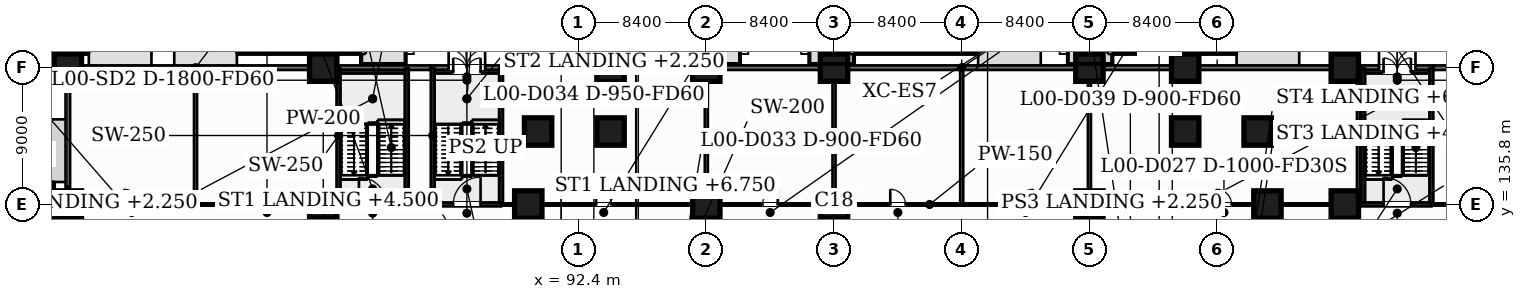
"""IFC4 building model, lengths in metres.
Left out: names, types, materials, properties, quantities, classifications, styles, units other than length and angle.
Written with IfcOpenShell. Run it as: python <this file> out.ifc"""

import sys

from ifc_helpers import new_model, si_unit, direction, frame, frame_2d, origin, origin_2d, place, context, subcontext, project, spatial, rectangle, extrude, element, fill, save


model = new_model("IFC4")
c1 = context("Model", 3, precision=1e-05, world=origin(), true_north=direction((0.0, 1.0)))
c2 = subcontext(c1, "Body", "Model", "MODEL_VIEW")
j1 = project(units=[si_unit("LENGTHUNIT", "METRE"), si_unit("PLANEANGLEUNIT", "RADIAN")], contexts=[c1])
p1 = place(None, origin())
s1 = spatial("IfcSite", under=j1, at=p1, CompositionType="ELEMENT")
p2 = place(p1, origin())
s2 = spatial("IfcBuilding", under=s1, at=p2, CompositionType="ELEMENT")
p3 = place(p2, origin())
s3 = spatial("IfcBuildingStorey", under=s2, at=p3, CompositionType="ELEMENT", Elevation=0.0)
for number, where, z_axis, x_axis in (
    (1, (58.8, 135.8, -0.35), (0.0, 0.0, 1.0), (1.0, 0.0, 0.0)),
    (2, (75.6, 135.8, -0.35), (0.0, 0.0, 1.0), (1.0, 0.0, 0.0)),
    (3, (89.088, 135.8, -0.35), (0.0, 0.0, 1.0), (1.0, 0.0, 0.0)),
    (4, (100.8, 135.8, -0.35), (0.0, 0.0, 1.0), (1.0, 0.0, 0.0)),
    (5, (109.2, 135.8, -0.35), (0.0, 0.0, 1.0), (1.0, 0.0, 0.0)),
    (6, (126.0, 135.8, -0.35), (0.0, 0.0, 1.0), (1.0, 0.0, 0.0)),
    (7, (137.711, 135.8, -0.35), (0.0, 0.0, 1.0), (1.0, 0.0, 0.0)),
    (8, (142.8, 135.8, -0.35), (0.0, 0.0, 1.0), (1.0, 0.0, 0.0)),
    (9, (89.735, 140.6, -0.35), (0.0, 0.0, 1.0), (1.0, 0.0, 0.0)),
    (10, (94.5, 140.6, -0.35), (0.0, 0.0, 1.0), (1.0, 0.0, 0.0)),
    (11, (132.3, 140.6, -0.35), (0.0, 0.0, 1.0), (1.0, 0.0, 0.0)),
    (12, (137.065, 140.6, -0.35), (0.0, 0.0, 1.0), (1.0, 0.0, 0.0)),
    (13, (58.8, 144.8, -0.35), (0.0, 0.0, 1.0), (1.0, 0.0, 0.0)),
    (14, (75.6, 144.8, -0.35), (0.0, 0.0, 1.0), (1.0, 0.0, 0.0)),
    (15, (94.5, 144.8, -0.35), (0.0, 0.0, 1.0), (1.0, 0.0, 0.0)),
    (16, (100.8, 144.8, -0.35), (0.0, 0.0, 1.0), (1.0, 0.0, 0.0)),
    (17, (109.2, 144.8, -0.35), (0.0, 0.0, 1.0), (1.0, 0.0, 0.0)),
    (18, (126.0, 144.8, -0.35), (0.0, 0.0, 1.0), (1.0, 0.0, 0.0)),
    (19, (132.3, 144.8, -0.35), (0.0, 0.0, 1.0), (1.0, 0.0, 0.0)),
    (20, (142.8, 144.8, -0.35), (0.0, 0.0, 1.0), (1.0, 0.0, 0.0)),
):
    element("IfcColumn", number, at=place(p3, frame(where, z_axis=z_axis, x_axis=x_axis)), inside=s3, PredefinedType="COLUMN", context=c2, shape_type="SweptSolid", body=[
        extrude(rectangle(XDim=1.8, YDim=1.8, at=origin_2d()), origin(), (0.0, 0.0, 1.0), 9.35),
    ])
p4 = place(p3, frame((59.7, 144.8, 0.0), z_axis=(0.0, 0.0, 1.0), x_axis=(1.0, 0.0, 0.0)))
e21 = element("IfcWall", 21, at=p4, inside=s3, PredefinedType="SOLIDWALL", context=c2, shape_type="SweptSolid", body=[
    extrude(rectangle(XDim=15.0, YDim=0.3, at=frame_2d((7.5, 0.0))), origin(), (0.0, 0.0, 1.0), 8.1),
])
p5 = place(p3, frame((76.5, 144.8, 0.0), z_axis=(0.0, 0.0, 1.0), x_axis=(1.0, 0.0, 0.0)))
e22 = element("IfcWall", 22, at=p5, inside=s3, PredefinedType="SOLIDWALL", context=c2, shape_type="SweptSolid", body=[
    extrude(rectangle(XDim=6.15, YDim=0.3, at=frame_2d((3.075, 0.0))), origin(), (0.0, 0.0, 1.0), 8.1),
])
p6 = place(p3, frame((87.45, 144.8, 0.0), z_axis=(0.0, 0.0, 1.0), x_axis=(1.0, 0.0, 0.0)))
e23 = element("IfcWall", 23, at=p6, inside=s3, PredefinedType="SOLIDWALL", context=c2, shape_type="SweptSolid", body=[
    extrude(rectangle(XDim=6.15, YDim=0.3, at=frame_2d((3.075, 0.0))), origin(), (0.0, 0.0, 1.0), 8.1),
])
p7 = place(p3, frame((82.65, 144.8, 0.0), z_axis=(0.0, 0.0, 1.0), x_axis=(1.0, 0.0, 0.0)))
e24 = element("IfcWall", 24, at=p7, inside=s3, PredefinedType="SOLIDWALL", context=c2, shape_type="SweptSolid", body=[
    extrude(rectangle(XDim=4.8, YDim=0.3, at=frame_2d((2.4, 0.0))), origin(), (0.0, 0.0, 1.0), 8.1),
])
p8 = place(p7, frame((1.2, 0.0, 0.0)))
e25 = element("IfcOpeningElement", 25, at=p8, cuts=e24, PredefinedType="OPENING", context=c2, shape_type="SweptSolid", body=[
    extrude(rectangle(XDim=2.4, YDim=2.4, at=frame_2d((1.2, 1.2))), frame((0.0, 0.16, 0.0), z_axis=(0.0, -1.0, 0.0), x_axis=(1.0, 0.0, 0.0)), (0.0, 0.0, 1.0), 0.32),
])
p9 = place(p3, frame((95.4, 144.8, 0.0), z_axis=(0.0, 0.0, 1.0), x_axis=(1.0, 0.0, 0.0)))
e26 = element("IfcWall", 26, at=p9, inside=s3, PredefinedType="SOLIDWALL", context=c2, shape_type="SweptSolid", body=[
    extrude(rectangle(XDim=4.5, YDim=0.3, at=frame_2d((2.25, 0.0))), origin(), (0.0, 0.0, 1.0), 8.1),
])
p10 = place(p3, frame((101.7, 144.8, 0.0), z_axis=(0.0, 0.0, 1.0), x_axis=(1.0, 0.0, 0.0)))
e27 = element("IfcWall", 27, at=p10, inside=s3, PredefinedType="SOLIDWALL", context=c2, shape_type="SweptSolid", body=[
    extrude(rectangle(XDim=6.6, YDim=0.3, at=frame_2d((3.3, 0.0))), origin(), (0.0, 0.0, 1.0), 8.1),
])
p11 = place(p3, frame((110.1, 144.8, 0.0), z_axis=(0.0, 0.0, 1.0), x_axis=(1.0, 0.0, 0.0)))
e28 = element("IfcWall", 28, at=p11, inside=s3, PredefinedType="SOLIDWALL", context=c2, shape_type="SweptSolid", body=[
    extrude(rectangle(XDim=15.0, YDim=0.3, at=frame_2d((7.5, 0.0))), origin(), (0.0, 0.0, 1.0), 8.1),
])
p12 = place(p3, frame((126.9, 144.8, 0.0), z_axis=(0.0, 0.0, 1.0), x_axis=(1.0, 0.0, 0.0)))
e29 = element("IfcWall", 29, at=p12, inside=s3, PredefinedType="SOLIDWALL", context=c2, shape_type="SweptSolid", body=[
    extrude(rectangle(XDim=4.5, YDim=0.3, at=frame_2d((2.25, 0.0))), origin(), (0.0, 0.0, 1.0), 8.1),
])
p13 = place(p3, frame((133.2, 144.8, 0.0), z_axis=(0.0, 0.0, 1.0), x_axis=(1.0, 0.0, 0.0)))
e30 = element("IfcWall", 30, at=p13, inside=s3, PredefinedType="SOLIDWALL", context=c2, shape_type="SweptSolid", body=[
    extrude(rectangle(XDim=8.7, YDim=0.3, at=frame_2d((4.35, 0.0))), origin(), (0.0, 0.0, 1.0), 8.1),
])
p14 = place(p3, frame((148.65, 144.8, 0.0), z_axis=(0.0, 0.0, 1.0), x_axis=(1.0, 0.0, 0.0)))
e31 = element("IfcWall", 31, at=p14, inside=s3, PredefinedType="SOLIDWALL", context=c2, shape_type="SweptSolid", body=[
    extrude(rectangle(XDim=1.2, YDim=0.3, at=frame_2d((0.6, 0.0))), origin(), (0.0, 0.0, 1.0), 8.1),
])
p15 = place(p3, frame((143.85, 144.8, 0.0), z_axis=(0.0, 0.0, 1.0), x_axis=(1.0, 0.0, 0.0)))
e32 = element("IfcWall", 32, at=p15, inside=s3, PredefinedType="SOLIDWALL", context=c2, shape_type="SweptSolid", body=[
    extrude(rectangle(XDim=4.8, YDim=0.3, at=frame_2d((2.4, 0.0))), origin(), (0.0, 0.0, 1.0), 8.1),
])
p16 = place(p15, frame((1.2, 0.0, 0.0)))
e33 = element("IfcOpeningElement", 33, at=p16, cuts=e32, PredefinedType="OPENING", context=c2, shape_type="SweptSolid", body=[
    extrude(rectangle(XDim=2.4, YDim=2.4, at=frame_2d((1.2, 1.2))), frame((0.0, 0.16, 0.0), z_axis=(0.0, -1.0, 0.0), x_axis=(1.0, 0.0, 0.0)), (0.0, 0.0, 1.0), 0.32),
])
p17 = place(p3, frame((76.47, 135.8, 0.0), z_axis=(0.0, 0.0, 1.0), x_axis=(1.0, 0.0, 0.0)))
e34 = element("IfcWall", 34, at=p17, inside=s3, PredefinedType="PARTITIONING", context=c2, shape_type="SweptSolid", body=[
    extrude(rectangle(XDim=4.63, YDim=0.25, at=frame_2d((2.315, 0.0))), origin(), (0.0, 0.0, 1.0), 8.5),
])
p18 = place(p17, frame((1.48, 0.0, 0.0)))
e35 = element("IfcOpeningElement", 35, at=p18, cuts=e34, PredefinedType="OPENING", context=c2, shape_type="SweptSolid", body=[
    extrude(rectangle(XDim=1.8, YDim=2.1, at=frame_2d((0.9, 1.05))), frame((0.0, 0.135, 0.0), z_axis=(0.0, -1.0, 0.0), x_axis=(1.0, 0.0, 0.0)), (0.0, 0.0, 1.0), 0.27),
])
p19 = place(p3, frame((82.8, 135.8, 0.0), z_axis=(0.0, 0.0, 1.0), x_axis=(1.0, 0.0, 0.0)))
e36 = element("IfcWall", 36, at=p19, inside=s3, PredefinedType="PARTITIONING", context=c2, shape_type="SweptSolid", body=[
    extrude(rectangle(XDim=4.5, YDim=0.25, at=frame_2d((2.25, 0.0))), origin(), (0.0, 0.0, 1.0), 8.5),
])
p20 = place(p19, frame((1.35, 0.0, 0.0)))
e37 = element("IfcOpeningElement", 37, at=p20, cuts=e36, PredefinedType="OPENING", context=c2, shape_type="SweptSolid", body=[
    extrude(rectangle(XDim=1.8, YDim=2.1, at=frame_2d((0.9, 1.05))), frame((0.0, 0.135, 0.0), z_axis=(0.0, -1.0, 0.0), x_axis=(1.0, 0.0, 0.0)), (0.0, 0.0, 1.0), 0.27),
])
p21 = place(p3, frame((143.67, 135.8, 0.0), z_axis=(0.0, 0.0, 1.0), x_axis=(1.0, 0.0, 0.0)))
e38 = element("IfcWall", 38, at=p21, inside=s3, PredefinedType="PARTITIONING", context=c2, shape_type="SweptSolid", body=[
    extrude(rectangle(XDim=4.83, YDim=0.25, at=frame_2d((2.415, 0.0))), origin(), (0.0, 0.0, 1.0), 8.5),
])
p22 = place(p21, frame((1.68, 0.0, 0.0)))
e39 = element("IfcOpeningElement", 39, at=p22, cuts=e38, PredefinedType="OPENING", context=c2, shape_type="SweptSolid", body=[
    extrude(rectangle(XDim=1.8, YDim=2.1, at=frame_2d((0.9, 1.05))), frame((0.0, 0.135, 0.0), z_axis=(0.0, -1.0, 0.0), x_axis=(1.0, 0.0, 0.0)), (0.0, 0.0, 1.0), 0.27),
])
p23 = place(p3, frame((58.85, 135.8, 0.0), z_axis=(0.0, 0.0, 1.0), x_axis=(1.0, 0.0, 0.0)))
e40 = element("IfcWall", 40, at=p23, inside=s3, PredefinedType="PARTITIONING", context=c2, shape_type="SweptSolid", body=[
    extrude(rectangle(XDim=17.62, YDim=0.15, at=frame_2d((8.81, 0.0))), origin(), (0.0, 0.0, 1.0), 8.5),
])
p24 = place(p23, frame((3.65, 0.0, 0.0)))
e41 = element("IfcOpeningElement", 41, at=p24, cuts=e40, PredefinedType="OPENING", context=c2, shape_type="SweptSolid", body=[
    extrude(rectangle(XDim=1.0, YDim=2.1, at=frame_2d((0.5, 1.05))), frame((0.0, 0.085, 0.0), z_axis=(0.0, -1.0, 0.0), x_axis=(1.0, 0.0, 0.0)), (0.0, 0.0, 1.0), 0.17),
])
p25 = place(p23, frame((12.55, 0.0, 0.0)))
e42 = element("IfcOpeningElement", 42, at=p25, cuts=e40, PredefinedType="OPENING", context=c2, shape_type="SweptSolid", body=[
    extrude(rectangle(XDim=1.0, YDim=2.1, at=frame_2d((0.5, 1.05))), frame((0.0, 0.085, 0.0), z_axis=(0.0, -1.0, 0.0), x_axis=(1.0, 0.0, 0.0)), (0.0, 0.0, 1.0), 0.17),
])
p26 = place(p3, frame((81.1, 135.8, 0.0), z_axis=(0.0, 0.0, 1.0), x_axis=(1.0, 0.0, 0.0)))
e43 = element("IfcWall", 43, at=p26, inside=s3, PredefinedType="PARTITIONING", context=c2, shape_type="SweptSolid", body=[
    extrude(rectangle(XDim=1.7, YDim=0.15, at=frame_2d((0.85, 0.0))), origin(), (0.0, 0.0, 1.0), 8.5),
])
p27 = place(p3, frame((87.3, 135.8, 0.0), z_axis=(0.0, 0.0, 1.0), x_axis=(1.0, 0.0, 0.0)))
e44 = element("IfcWall", 44, at=p27, inside=s3, PredefinedType="PARTITIONING", context=c2, shape_type="SweptSolid", body=[
    extrude(rectangle(XDim=56.37, YDim=0.15, at=frame_2d((28.185, 0.0))), origin(), (0.0, 0.0, 1.0), 8.5),
])
p28 = place(p27, frame((6.25, 0.0, 0.0)))
e45 = element("IfcOpeningElement", 45, at=p28, cuts=e44, PredefinedType="OPENING", context=c2, shape_type="SweptSolid", body=[
    extrude(rectangle(XDim=1.0, YDim=2.1, at=frame_2d((0.5, 1.05))), frame((0.0, 0.085, 0.0), z_axis=(0.0, -1.0, 0.0), x_axis=(1.0, 0.0, 0.0)), (0.0, 0.0, 1.0), 0.17),
])
p29 = place(p27, frame((17.2, 0.0, 0.0)))
e46 = element("IfcOpeningElement", 46, at=p29, cuts=e44, PredefinedType="OPENING", context=c2, shape_type="SweptSolid", body=[
    extrude(rectangle(XDim=1.0, YDim=2.1, at=frame_2d((0.5, 1.05))), frame((0.0, 0.085, 0.0), z_axis=(0.0, -1.0, 0.0), x_axis=(1.0, 0.0, 0.0)), (0.0, 0.0, 1.0), 0.17),
])
p30 = place(p27, frame((25.6, 0.0, 0.0)))
e47 = element("IfcOpeningElement", 47, at=p30, cuts=e44, PredefinedType="OPENING", context=c2, shape_type="SweptSolid", body=[
    extrude(rectangle(XDim=1.0, YDim=2.1, at=frame_2d((0.5, 1.05))), frame((0.0, 0.085, 0.0), z_axis=(0.0, -1.0, 0.0), x_axis=(1.0, 0.0, 0.0)), (0.0, 0.0, 1.0), 0.17),
])
p31 = place(p27, frame((34.0, 0.0, 0.0)))
e48 = element("IfcOpeningElement", 48, at=p31, cuts=e44, PredefinedType="OPENING", context=c2, shape_type="SweptSolid", body=[
    extrude(rectangle(XDim=1.0, YDim=2.1, at=frame_2d((0.5, 1.05))), frame((0.0, 0.085, 0.0), z_axis=(0.0, -1.0, 0.0), x_axis=(1.0, 0.0, 0.0)), (0.0, 0.0, 1.0), 0.17),
])
p32 = place(p27, frame((47.05, 0.0, 0.0)))
e49 = element("IfcOpeningElement", 49, at=p32, cuts=e44, PredefinedType="OPENING", context=c2, shape_type="SweptSolid", body=[
    extrude(rectangle(XDim=1.0, YDim=2.1, at=frame_2d((0.5, 1.05))), frame((0.0, 0.085, 0.0), z_axis=(0.0, -1.0, 0.0), x_axis=(1.0, 0.0, 0.0)), (0.0, 0.0, 1.0), 0.17),
])
p33 = place(p3, frame((148.5, 135.8, 0.0), z_axis=(0.0, 0.0, 1.0), x_axis=(1.0, 0.0, 0.0)))
e50 = element("IfcWall", 50, at=p33, inside=s3, PredefinedType="PARTITIONING", context=c2, shape_type="SweptSolid", body=[
    extrude(rectangle(XDim=1.5, YDim=0.15, at=frame_2d((0.75, 0.0))), origin(), (0.0, 0.0, 1.0), 8.5),
])
p34 = place(p3, frame((67.2, 135.875, 0.0), z_axis=(0.0, 0.0, 1.0), x_axis=(0.0, 1.0, 0.0)))
e51 = element("IfcWall", 51, at=p34, inside=s3, PredefinedType="PARTITIONING", context=c2, shape_type="SweptSolid", body=[
    extrude(rectangle(XDim=8.875, YDim=0.2, at=frame_2d((4.438, 0.0))), origin(), (0.0, 0.0, 1.0), 8.5),
])
for number, where, z_axis, x_axis in (
    (52, (76.6, 135.925, 0.0), (0.0, 0.0, 1.0), (0.0, 1.0, 0.0)),
    (53, (81.1, 135.925, 0.0), (0.0, 0.0, 1.0), (0.0, 1.0, 0.0)),
    (54, (82.8, 135.925, 0.0), (0.0, 0.0, 1.0), (0.0, 1.0, 0.0)),
    (55, (87.3, 135.925, 0.0), (0.0, 0.0, 1.0), (0.0, 1.0, 0.0)),
):
    element("IfcWall", number, at=place(p3, frame(where, z_axis=z_axis, x_axis=x_axis)), inside=s3, PredefinedType="PARTITIONING", context=c2, shape_type="SweptSolid", body=[
        extrude(rectangle(XDim=8.825, YDim=0.25, at=frame_2d((4.413, 0.0))), origin(), (0.0, 0.0, 1.0), 8.5),
    ])
for number, where, z_axis, x_axis in (
    (56, (100.8, 135.875, 0.0), (0.0, 0.0, 1.0), (0.0, 1.0, 0.0)),
    (57, (109.2, 135.875, 0.0), (0.0, 0.0, 1.0), (0.0, 1.0, 0.0)),
    (58, (117.6, 135.875, 0.0), (0.0, 0.0, 1.0), (0.0, 1.0, 0.0)),
    (59, (126.0, 135.875, 0.0), (0.0, 0.0, 1.0), (0.0, 1.0, 0.0)),
    (60, (143.7, 135.875, 0.0), (0.0, 0.0, 1.0), (0.0, 1.0, 0.0)),
):
    element("IfcWall", number, at=place(p3, frame(where, z_axis=z_axis, x_axis=x_axis)), inside=s3, PredefinedType="PARTITIONING", context=c2, shape_type="SweptSolid", body=[
        extrude(rectangle(XDim=8.875, YDim=0.2, at=frame_2d((4.438, 0.0))), origin(), (0.0, 0.0, 1.0), 8.5),
    ])
for number, where, z_axis, x_axis in (
    (61, (144.0, 135.925, 0.0), (0.0, 0.0, 1.0), (0.0, 1.0, 0.0)),
    (62, (148.5, 135.925, 0.0), (0.0, 0.0, 1.0), (0.0, 1.0, 0.0)),
):
    element("IfcWall", number, at=place(p3, frame(where, z_axis=z_axis, x_axis=x_axis)), inside=s3, PredefinedType="PARTITIONING", context=c2, shape_type="SweptSolid", body=[
        extrude(rectangle(XDim=8.825, YDim=0.25, at=frame_2d((4.413, 0.0))), origin(), (0.0, 0.0, 1.0), 8.5),
    ])
p35 = place(p3, frame((76.725, 144.538, 0.0), z_axis=(0.0, 0.0, 1.0), x_axis=(1.0, 0.0, 0.0)))
e63 = element("IfcWall", 63, at=p35, inside=s3, PredefinedType="PARTITIONING", context=c2, shape_type="SweptSolid", body=[
    extrude(rectangle(XDim=4.25, YDim=0.225, at=frame_2d((2.125, 0.0))), origin(), (0.0, 0.0, 1.0), 8.5),
])
p36 = place(p3, frame((82.925, 144.538, 0.0), z_axis=(0.0, 0.0, 1.0), x_axis=(1.0, 0.0, 0.0)))
e64 = element("IfcWall", 64, at=p36, inside=s3, PredefinedType="PARTITIONING", context=c2, shape_type="SweptSolid", body=[
    extrude(rectangle(XDim=4.25, YDim=0.225, at=frame_2d((2.125, 0.0))), origin(), (0.0, 0.0, 1.0), 8.5),
])
p37 = place(p36, frame((1.225, 0.0, 0.0)))
e65 = element("IfcOpeningElement", 65, at=p37, cuts=e64, PredefinedType="OPENING", context=c2, shape_type="SweptSolid", body=[
    extrude(rectangle(XDim=1.8, YDim=2.1, at=frame_2d((0.9, 1.05))), frame((0.0, 0.123, 0.0), z_axis=(0.0, -1.0, 0.0), x_axis=(1.0, 0.0, 0.0)), (0.0, 0.0, 1.0), 0.245),
])
p38 = place(p3, frame((144.125, 144.538, 0.0), z_axis=(0.0, 0.0, 1.0), x_axis=(1.0, 0.0, 0.0)))
e66 = element("IfcWall", 66, at=p38, inside=s3, PredefinedType="PARTITIONING", context=c2, shape_type="SweptSolid", body=[
    extrude(rectangle(XDim=4.25, YDim=0.225, at=frame_2d((2.125, 0.0))), origin(), (0.0, 0.0, 1.0), 8.5),
])
p39 = place(p38, frame((1.225, 0.0, 0.0)))
e67 = element("IfcOpeningElement", 67, at=p39, cuts=e66, PredefinedType="OPENING", context=c2, shape_type="SweptSolid", body=[
    extrude(rectangle(XDim=1.8, YDim=2.1, at=frame_2d((0.9, 1.05))), frame((0.0, 0.123, 0.0), z_axis=(0.0, -1.0, 0.0), x_axis=(1.0, 0.0, 0.0)), (0.0, 0.0, 1.0), 0.245),
])
p40 = place(p8, origin())
e68 = element("IfcDoor", 68, at=p40, inside=s3, OperationType="DOUBLE_DOOR_DOUBLE_SWING", PredefinedType="DOOR", context=c2, shape_type="SweptSolid", body=[
    extrude(rectangle(XDim=2.4, YDim=2.4, at=frame_2d((1.2, 1.2))), frame((0.0, 0.025, 0.0), z_axis=(0.0, -1.0, 0.0), x_axis=(1.0, 0.0, 0.0)), (0.0, 0.0, 1.0), 0.05),
])
fill(e25, e68)
p41 = place(p16, origin())
e69 = element("IfcDoor", 69, at=p41, inside=s3, OperationType="DOUBLE_DOOR_DOUBLE_SWING", PredefinedType="DOOR", context=c2, shape_type="SweptSolid", body=[
    extrude(rectangle(XDim=2.4, YDim=2.4, at=frame_2d((1.2, 1.2))), frame((0.0, 0.025, 0.0), z_axis=(0.0, -1.0, 0.0), x_axis=(1.0, 0.0, 0.0)), (0.0, 0.0, 1.0), 0.05),
])
fill(e33, e69)
p42 = place(p18, origin())
e70 = element("IfcDoor", 70, at=p42, inside=s3, OperationType="SINGLE_SWING_LEFT", PredefinedType="DOOR", context=c2, shape_type="SweptSolid", body=[
    extrude(rectangle(XDim=1.8, YDim=2.1, at=frame_2d((0.9, 1.05))), frame((0.0, 0.025, 0.0), z_axis=(0.0, -1.0, 0.0), x_axis=(1.0, 0.0, 0.0)), (0.0, 0.0, 1.0), 0.05),
])
fill(e35, e70)
p43 = place(p20, origin())
e71 = element("IfcDoor", 71, at=p43, inside=s3, OperationType="SINGLE_SWING_RIGHT", PredefinedType="DOOR", context=c2, shape_type="SweptSolid", body=[
    extrude(rectangle(XDim=1.8, YDim=2.1, at=frame_2d((0.9, 1.05))), frame((0.0, 0.025, 0.0), z_axis=(0.0, -1.0, 0.0), x_axis=(1.0, 0.0, 0.0)), (0.0, 0.0, 1.0), 0.05),
])
fill(e37, e71)
p44 = place(p22, origin())
e72 = element("IfcDoor", 72, at=p44, inside=s3, OperationType="SINGLE_SWING_LEFT", PredefinedType="DOOR", context=c2, shape_type="SweptSolid", body=[
    extrude(rectangle(XDim=1.8, YDim=2.1, at=frame_2d((0.9, 1.05))), frame((0.0, 0.025, 0.0), z_axis=(0.0, -1.0, 0.0), x_axis=(1.0, 0.0, 0.0)), (0.0, 0.0, 1.0), 0.05),
])
fill(e39, e72)
p45 = place(p24, origin())
e73 = element("IfcDoor", 73, at=p45, inside=s3, OperationType="SINGLE_SWING_LEFT", PredefinedType="DOOR", context=c2, shape_type="SweptSolid", body=[
    extrude(rectangle(XDim=1.0, YDim=2.1, at=frame_2d((0.5, 1.05))), frame((0.0, 0.025, 0.0), z_axis=(0.0, -1.0, 0.0), x_axis=(1.0, 0.0, 0.0)), (0.0, 0.0, 1.0), 0.05),
])
fill(e41, e73)
p46 = place(p25, origin())
e74 = element("IfcDoor", 74, at=p46, inside=s3, OperationType="SINGLE_SWING_RIGHT", PredefinedType="DOOR", context=c2, shape_type="SweptSolid", body=[
    extrude(rectangle(XDim=1.0, YDim=2.1, at=frame_2d((0.5, 1.05))), frame((0.0, 0.025, 0.0), z_axis=(0.0, -1.0, 0.0), x_axis=(1.0, 0.0, 0.0)), (0.0, 0.0, 1.0), 0.05),
])
fill(e42, e74)
p47 = place(p28, origin())
e75 = element("IfcDoor", 75, at=p47, inside=s3, OperationType="SINGLE_SWING_LEFT", PredefinedType="DOOR", context=c2, shape_type="SweptSolid", body=[
    extrude(rectangle(XDim=1.0, YDim=2.1, at=frame_2d((0.5, 1.05))), frame((0.0, 0.025, 0.0), z_axis=(0.0, -1.0, 0.0), x_axis=(1.0, 0.0, 0.0)), (0.0, 0.0, 1.0), 0.05),
])
fill(e45, e75)
p48 = place(p29, origin())
e76 = element("IfcDoor", 76, at=p48, inside=s3, OperationType="SINGLE_SWING_RIGHT", PredefinedType="DOOR", context=c2, shape_type="SweptSolid", body=[
    extrude(rectangle(XDim=1.0, YDim=2.1, at=frame_2d((0.5, 1.05))), frame((0.0, 0.025, 0.0), z_axis=(0.0, -1.0, 0.0), x_axis=(1.0, 0.0, 0.0)), (0.0, 0.0, 1.0), 0.05),
])
fill(e46, e76)
p49 = place(p30, origin())
e77 = element("IfcDoor", 77, at=p49, inside=s3, OperationType="SINGLE_SWING_LEFT", PredefinedType="DOOR", context=c2, shape_type="SweptSolid", body=[
    extrude(rectangle(XDim=1.0, YDim=2.1, at=frame_2d((0.5, 1.05))), frame((0.0, 0.025, 0.0), z_axis=(0.0, -1.0, 0.0), x_axis=(1.0, 0.0, 0.0)), (0.0, 0.0, 1.0), 0.05),
])
fill(e47, e77)
p50 = place(p31, origin())
e78 = element("IfcDoor", 78, at=p50, inside=s3, OperationType="SINGLE_SWING_RIGHT", PredefinedType="DOOR", context=c2, shape_type="SweptSolid", body=[
    extrude(rectangle(XDim=1.0, YDim=2.1, at=frame_2d((0.5, 1.05))), frame((0.0, 0.025, 0.0), z_axis=(0.0, -1.0, 0.0), x_axis=(1.0, 0.0, 0.0)), (0.0, 0.0, 1.0), 0.05),
])
fill(e48, e78)
p51 = place(p32, origin())
e79 = element("IfcDoor", 79, at=p51, inside=s3, OperationType="SINGLE_SWING_LEFT", PredefinedType="DOOR", context=c2, shape_type="SweptSolid", body=[
    extrude(rectangle(XDim=1.0, YDim=2.1, at=frame_2d((0.5, 1.05))), frame((0.0, 0.025, 0.0), z_axis=(0.0, -1.0, 0.0), x_axis=(1.0, 0.0, 0.0)), (0.0, 0.0, 1.0), 0.05),
])
fill(e49, e79)
p52 = place(p37, origin())
e80 = element("IfcDoor", 80, at=p52, inside=s3, OperationType="DOUBLE_DOOR_DOUBLE_SWING", PredefinedType="DOOR", context=c2, shape_type="SweptSolid", body=[
    extrude(rectangle(XDim=1.8, YDim=2.1, at=frame_2d((0.9, 1.05))), frame((0.0, 0.025, 0.0), z_axis=(0.0, -1.0, 0.0), x_axis=(1.0, 0.0, 0.0)), (0.0, 0.0, 1.0), 0.05),
])
fill(e65, e80)
p53 = place(p39, origin())
e81 = element("IfcDoor", 81, at=p53, inside=s3, OperationType="DOUBLE_DOOR_DOUBLE_SWING", PredefinedType="DOOR", context=c2, shape_type="SweptSolid", body=[
    extrude(rectangle(XDim=1.8, YDim=2.1, at=frame_2d((0.9, 1.05))), frame((0.0, 0.025, 0.0), z_axis=(0.0, -1.0, 0.0), x_axis=(1.0, 0.0, 0.0)), (0.0, 0.0, 1.0), 0.05),
])
fill(e67, e81)
save(model, sys.argv[1])
